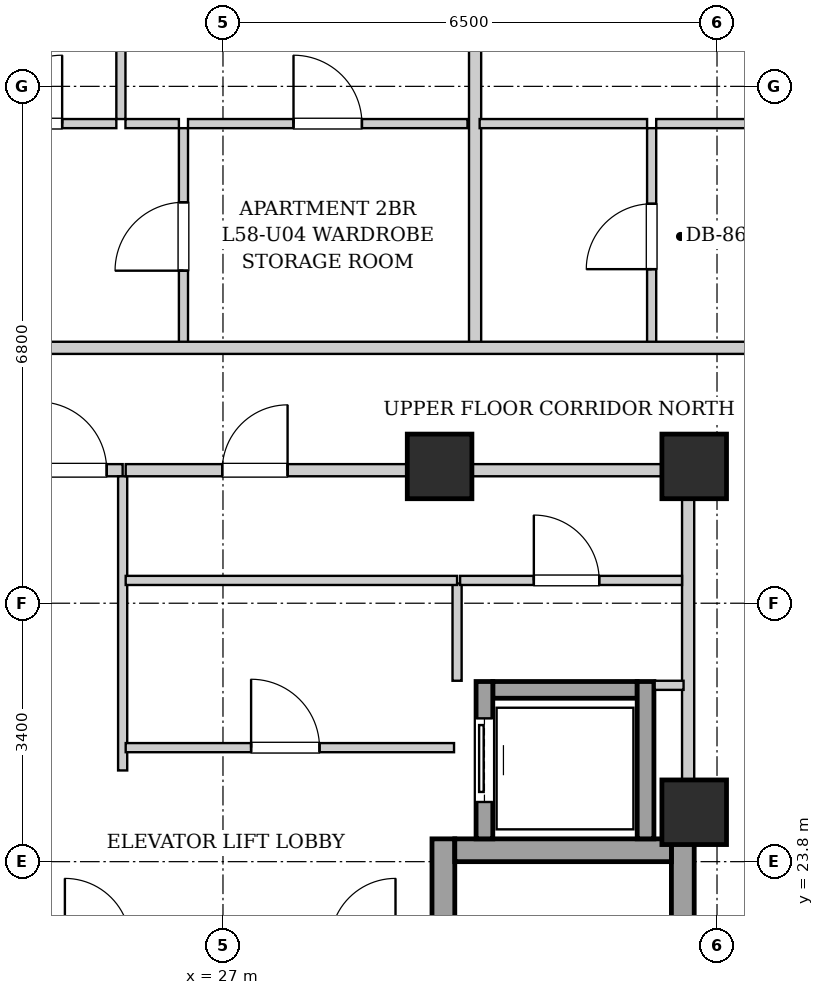
"""IFC4 building model, lengths in metres.
Left out: names, types, materials, properties, quantities, classifications, styles, units other than length and angle.
Written with IfcOpenShell. Run it as: python <this file> out.ifc"""

import sys

from ifc_helpers import new_model, si_unit, direction, frame, frame_2d, origin, origin_2d, place, context, subcontext, project, spatial, rectangle, extrude, element, fill, save


model = new_model("IFC4")
c1 = context("Model", 3, precision=1e-05, world=origin(), true_north=direction((0.0, 1.0)))
c2 = subcontext(c1, "Body", "Model", "MODEL_VIEW")
j1 = project(units=[si_unit("LENGTHUNIT", "METRE"), si_unit("PLANEANGLEUNIT", "RADIAN")], contexts=[c1])
p1 = place(None, origin())
s1 = spatial("IfcSite", under=j1, at=p1, CompositionType="ELEMENT")
p2 = place(p1, origin())
s2 = spatial("IfcBuilding", under=s1, at=p2, CompositionType="ELEMENT")
p3 = place(p2, frame((0.0, 0.0, 200.8)))
s3 = spatial("IfcBuildingStorey", under=s2, at=p3, CompositionType="ELEMENT", Elevation=200.8)
for number, where, z_axis, x_axis in (
    (1, (29.85, 29.0, 0.0), (0.0, 0.0, 1.0), (1.0, 0.0, 0.0)),
    (2, (33.2, 29.0, 0.0), (0.0, 0.0, 1.0), (1.0, 0.0, 0.0)),
    (3, (33.2, 24.45, 0.0), (0.0, 0.0, 1.0), (1.0, 0.0, 0.0)),
):
    element("IfcColumn", number, at=place(p3, frame(where, z_axis=z_axis, x_axis=x_axis)), inside=s3, PredefinedType="COLUMN", context=c2, shape_type="SweptSolid", body=[
        extrude(rectangle(XDim=0.85, YDim=0.85, at=origin_2d()), origin(), (0.0, 0.0, 1.0), 3.3),
    ])
for number, where, z_axis, x_axis in (
    (4, (29.9, 15.1, 0.0), (0.0, 0.0, 1.0), (0.0, 1.0, 0.0)),
    (5, (33.05, 15.1, 0.0), (0.0, 0.0, 1.0), (0.0, 1.0, 0.0)),
):
    element("IfcWall", number, at=place(p3, frame(where, z_axis=z_axis, x_axis=x_axis)), inside=s3, PredefinedType="SHEAR", context=c2, shape_type="SweptSolid", body=[
        extrude(rectangle(XDim=9.0, YDim=0.3, at=frame_2d((4.5, 0.0))), origin(), (0.0, 0.0, 1.0), 3.04),
    ])
p4 = place(p3, frame((30.05, 23.95, 0.0), z_axis=(0.0, 0.0, 1.0), x_axis=(1.0, 0.0, 0.0)))
e6 = element("IfcWall", 6, at=p4, inside=s3, PredefinedType="SHEAR", context=c2, shape_type="SweptSolid", body=[
    extrude(rectangle(XDim=2.85, YDim=0.3, at=frame_2d((1.425, 0.0))), origin(), (0.0, 0.0, 1.0), 3.04),
])
p5 = place(p3, frame((30.55, 26.06, 0.0), z_axis=(0.0, 0.0, 1.0), x_axis=(1.0, 0.0, 0.0)))
e7 = element("IfcWall", 7, at=p5, inside=s3, PredefinedType="SHEAR", context=c2, shape_type="SweptSolid", body=[
    extrude(rectangle(XDim=1.9, YDim=0.22, at=frame_2d((0.95, 0.0))), origin(), (0.0, 0.0, 1.0), 3.04),
])
p6 = place(p3, frame((30.44, 24.1, 0.0), z_axis=(0.0, 0.0, 1.0), x_axis=(0.0, 1.0, 0.0)))
e8 = element("IfcWall", 8, at=p6, inside=s3, PredefinedType="SHEAR", context=c2, shape_type="SweptSolid", body=[
    extrude(rectangle(XDim=2.07, YDim=0.22, at=frame_2d((1.035, 0.0))), origin(), (0.0, 0.0, 1.0), 3.04),
])
p7 = place(p6, frame((0.485, 0.0, 0.0)))
e9 = element("IfcOpeningElement", 9, at=p7, cuts=e8, PredefinedType="OPENING", context=c2, shape_type="SweptSolid", body=[
    extrude(rectangle(XDim=1.1, YDim=2.15, at=frame_2d((0.55, 1.075))), frame((0.0, 0.12, 0.0), z_axis=(0.0, -1.0, 0.0), x_axis=(1.0, 0.0, 0.0)), (0.0, 0.0, 1.0), 0.24),
])
p8 = place(p3, frame((32.56, 24.1, 0.0), z_axis=(0.0, 0.0, 1.0), x_axis=(0.0, 1.0, 0.0)))
e10 = element("IfcWall", 10, at=p8, inside=s3, PredefinedType="SHEAR", context=c2, shape_type="SweptSolid", body=[
    extrude(rectangle(XDim=2.07, YDim=0.22, at=frame_2d((1.035, 0.0))), origin(), (0.0, 0.0, 1.0), 3.04),
])
p9 = place(p3, frame((33.12, 24.12, 0.0), z_axis=(0.0, 0.0, 1.0), x_axis=(0.0, 1.0, 0.0)))
e11 = element("IfcWall", 11, at=p9, inside=s3, PredefinedType="PARTITIONING", context=c2, shape_type="SweptSolid", body=[
    extrude(rectangle(XDim=4.76, YDim=0.16, at=frame_2d((2.38, 0.0))), origin(), (0.0, 0.0, 1.0), 3.04),
])
p10 = place(p3, frame((24.36, 28.95, 0.0), z_axis=(0.0, 0.0, 1.0), x_axis=(1.0, 0.0, 0.0)))
e12 = element("IfcWall", 12, at=p10, inside=s3, PredefinedType="PARTITIONING", context=c2, shape_type="SweptSolid", body=[
    extrude(rectangle(XDim=1.32, YDim=0.16, at=frame_2d((0.66, 0.0))), origin(), (0.0, 0.0, 1.0), 2.556),
])
p11 = place(p10, frame((0.21, 0.0, 0.0)))
e13 = element("IfcOpeningElement", 13, at=p11, cuts=e12, PredefinedType="OPENING", context=c2, shape_type="SweptSolid", body=[
    extrude(rectangle(XDim=0.9, YDim=2.05, at=frame_2d((0.45, 1.025))), frame((0.0, 0.09, 0.0), z_axis=(0.0, -1.0, 0.0), x_axis=(1.0, 0.0, 0.0)), (0.0, 0.0, 1.0), 0.18),
])
p12 = place(p3, frame((25.68, 25.0, 0.0), z_axis=(0.0, 0.0, 1.0), x_axis=(0.0, 1.0, 0.0)))
e14 = element("IfcWall", 14, at=p12, inside=s3, PredefinedType="PARTITIONING", context=c2, shape_type="SweptSolid", body=[
    extrude(rectangle(XDim=3.87, YDim=0.12, at=frame_2d((1.935, 0.0))), origin(), (0.0, 0.0, 1.0), 3.04),
])
p13 = place(p3, frame((30.08, 26.18, 0.0), z_axis=(0.0, 0.0, 1.0), x_axis=(0.0, 1.0, 0.0)))
e15 = element("IfcWall", 15, at=p13, inside=s3, PredefinedType="PARTITIONING", context=c2, shape_type="SweptSolid", body=[
    extrude(rectangle(XDim=1.28, YDim=0.12, at=frame_2d((0.64, 0.0))), origin(), (0.0, 0.0, 1.0), 3.04),
])
p14 = place(p3, frame((32.68, 26.12, 0.0), z_axis=(0.0, 0.0, 1.0), x_axis=(1.0, 0.0, 0.0)))
e16 = element("IfcWall", 16, at=p14, inside=s3, PredefinedType="PARTITIONING", context=c2, shape_type="SweptSolid", body=[
    extrude(rectangle(XDim=0.38, YDim=0.12, at=frame_2d((0.19, 0.0))), origin(), (0.0, 0.0, 1.0), 3.04),
])
p15 = place(p3, frame((30.12, 27.5, 0.0), z_axis=(0.0, 0.0, 1.0), x_axis=(1.0, 0.0, 0.0)))
e17 = element("IfcWall", 17, at=p15, inside=s3, PredefinedType="PARTITIONING", context=c2, shape_type="SweptSolid", body=[
    extrude(rectangle(XDim=2.92, YDim=0.12, at=frame_2d((1.46, 0.0))), origin(), (0.0, 0.0, 1.0), 3.04),
])
p16 = place(p15, frame((0.97, 0.0, 0.0)))
e18 = element("IfcOpeningElement", 18, at=p16, cuts=e17, PredefinedType="OPENING", context=c2, shape_type="SweptSolid", body=[
    extrude(rectangle(XDim=0.86, YDim=2.05, at=frame_2d((0.43, 1.025))), frame((0.0, 0.07, 0.0), z_axis=(0.0, -1.0, 0.0), x_axis=(1.0, 0.0, 0.0)), (0.0, 0.0, 1.0), 0.14),
])
p17 = place(p3, frame((25.72, 27.5, 0.0), z_axis=(0.0, 0.0, 1.0), x_axis=(1.0, 0.0, 0.0)))
e19 = element("IfcWall", 19, at=p17, inside=s3, PredefinedType="PARTITIONING", context=c2, shape_type="SweptSolid", body=[
    extrude(rectangle(XDim=4.36, YDim=0.12, at=frame_2d((2.18, 0.0))), origin(), (0.0, 0.0, 1.0), 3.04),
])
p18 = place(p3, frame((25.72, 25.3, 0.0), z_axis=(0.0, 0.0, 1.0), x_axis=(1.0, 0.0, 0.0)))
e20 = element("IfcWall", 20, at=p18, inside=s3, PredefinedType="PARTITIONING", context=c2, shape_type="SweptSolid", body=[
    extrude(rectangle(XDim=4.32, YDim=0.12, at=frame_2d((2.16, 0.0))), origin(), (0.0, 0.0, 1.0), 3.04),
])
p19 = place(p18, frame((1.65, 0.0, 0.0)))
e21 = element("IfcOpeningElement", 21, at=p19, cuts=e20, PredefinedType="OPENING", context=c2, shape_type="SweptSolid", body=[
    extrude(rectangle(XDim=0.9, YDim=2.05, at=frame_2d((0.45, 1.025))), frame((0.0, 0.07, 0.0), z_axis=(0.0, -1.0, 0.0), x_axis=(1.0, 0.0, 0.0)), (0.0, 0.0, 1.0), 0.14),
])
p20 = place(p3, frame((25.72, 28.95, 0.0), z_axis=(0.0, 0.0, 1.0), x_axis=(1.0, 0.0, 0.0)))
e22 = element("IfcWall", 22, at=p20, inside=s3, PredefinedType="PARTITIONING", context=c2, shape_type="SweptSolid", body=[
    extrude(rectangle(XDim=7.32, YDim=0.16, at=frame_2d((3.66, 0.0))), origin(), (0.0, 0.0, 1.0), 2.556),
])
p21 = place(p20, frame((1.27, 0.0, 0.0)))
e23 = element("IfcOpeningElement", 23, at=p21, cuts=e22, PredefinedType="OPENING", context=c2, shape_type="SweptSolid", body=[
    extrude(rectangle(XDim=0.86, YDim=2.05, at=frame_2d((0.43, 1.025))), frame((0.0, 0.09, 0.0), z_axis=(0.0, -1.0, 0.0), x_axis=(1.0, 0.0, 0.0)), (0.0, 0.0, 1.0), 0.18),
])
p22 = place(p3, frame((26.48, 30.6, 0.0), z_axis=(0.0, 0.0, 1.0), x_axis=(0.0, 1.0, 0.0)))
e24 = element("IfcWall", 24, at=p22, inside=s3, PredefinedType="PARTITIONING", context=c2, shape_type="SweptSolid", body=[
    extrude(rectangle(XDim=2.85, YDim=0.12, at=frame_2d((1.425, 0.0))), origin(), (0.0, 0.0, 1.0), 3.04),
])
p23 = place(p22, frame((0.975, 0.0, 0.0)))
e25 = element("IfcOpeningElement", 25, at=p23, cuts=e24, PredefinedType="OPENING", context=c2, shape_type="SweptSolid", body=[
    extrude(rectangle(XDim=0.9, YDim=2.05, at=frame_2d((0.45, 1.025))), frame((0.0, 0.07, 0.0), z_axis=(0.0, -1.0, 0.0), x_axis=(1.0, 0.0, 0.0)), (0.0, 0.0, 1.0), 0.14),
])
p24 = place(p3, frame((23.27, 33.51, 0.0), z_axis=(0.0, 0.0, 1.0), x_axis=(1.0, 0.0, 0.0)))
e26 = element("IfcWall", 26, at=p24, inside=s3, PredefinedType="PARTITIONING", context=c2, shape_type="SweptSolid", body=[
    extrude(rectangle(XDim=2.327, YDim=0.12, at=frame_2d((1.164, 0.0))), origin(), (0.0, 0.0, 1.0), 3.04),
])
p25 = place(p24, frame((0.714, 0.0, 0.0)))
e27 = element("IfcOpeningElement", 27, at=p25, cuts=e26, PredefinedType="OPENING", context=c2, shape_type="SweptSolid", body=[
    extrude(rectangle(XDim=0.9, YDim=2.05, at=frame_2d((0.45, 1.025))), frame((0.0, 0.07, 0.0), z_axis=(0.0, -1.0, 0.0), x_axis=(1.0, 0.0, 0.0)), (0.0, 0.0, 1.0), 0.14),
])
p26 = place(p3, frame((25.717, 33.51, 0.0), z_axis=(0.0, 0.0, 1.0), x_axis=(1.0, 0.0, 0.0)))
e28 = element("IfcWall", 28, at=p26, inside=s3, PredefinedType="PARTITIONING", context=c2, shape_type="SweptSolid", body=[
    extrude(rectangle(XDim=0.703, YDim=0.12, at=frame_2d((0.352, 0.0))), origin(), (0.0, 0.0, 1.0), 3.04),
])
p27 = place(p3, frame((26.54, 33.51, 0.0), z_axis=(0.0, 0.0, 1.0), x_axis=(1.0, 0.0, 0.0)))
e29 = element("IfcWall", 29, at=p27, inside=s3, PredefinedType="PARTITIONING", context=c2, shape_type="SweptSolid", body=[
    extrude(rectangle(XDim=3.677, YDim=0.12, at=frame_2d((1.838, 0.0))), origin(), (0.0, 0.0, 1.0), 3.04),
])
p28 = place(p27, frame((1.388, 0.0, 0.0)))
e30 = element("IfcOpeningElement", 30, at=p28, cuts=e29, PredefinedType="OPENING", context=c2, shape_type="SweptSolid", body=[
    extrude(rectangle(XDim=0.9, YDim=2.05, at=frame_2d((0.45, 1.025))), frame((0.0, 0.07, 0.0), z_axis=(0.0, -1.0, 0.0), x_axis=(1.0, 0.0, 0.0)), (0.0, 0.0, 1.0), 0.14),
])
p29 = place(p3, frame((25.657, 33.57, 0.0), z_axis=(0.0, 0.0, 1.0), x_axis=(0.0, 1.0, 0.0)))
e31 = element("IfcWall", 31, at=p29, inside=s3, PredefinedType="PARTITIONING", context=c2, shape_type="SweptSolid", body=[
    extrude(rectangle(XDim=6.35, YDim=0.12, at=frame_2d((3.175, 0.0))), origin(), (0.0, 0.0, 1.0), 3.04),
])
p30 = place(p29, frame((2.71, 0.0, 0.0)))
e32 = element("IfcOpeningElement", 32, at=p30, cuts=e31, PredefinedType="OPENING", context=c2, shape_type="SweptSolid", body=[
    extrude(rectangle(XDim=0.9, YDim=2.05, at=frame_2d((0.45, 1.025))), frame((0.0, 0.07, 0.0), z_axis=(0.0, -1.0, 0.0), x_axis=(1.0, 0.0, 0.0)), (0.0, 0.0, 1.0), 0.14),
])
p31 = place(p3, frame((30.317, 30.6, 0.0), z_axis=(0.0, 0.0, 1.0), x_axis=(0.0, 1.0, 0.0)))
e33 = element("IfcWall", 33, at=p31, inside=s3, PredefinedType="PARTITIONING", context=c2, shape_type="SweptSolid", body=[
    extrude(rectangle(XDim=9.32, YDim=0.16, at=frame_2d((4.66, 0.0))), origin(), (0.0, 0.0, 1.0), 3.04),
])
p32 = place(p3, frame((32.64, 30.6, 0.0), z_axis=(0.0, 0.0, 1.0), x_axis=(0.0, 1.0, 0.0)))
e34 = element("IfcWall", 34, at=p32, inside=s3, PredefinedType="PARTITIONING", context=c2, shape_type="SweptSolid", body=[
    extrude(rectangle(XDim=2.85, YDim=0.12, at=frame_2d((1.425, 0.0))), origin(), (0.0, 0.0, 1.0), 3.04),
])
p33 = place(p32, frame((0.995, 0.0, 0.0)))
e35 = element("IfcOpeningElement", 35, at=p33, cuts=e34, PredefinedType="OPENING", context=c2, shape_type="SweptSolid", body=[
    extrude(rectangle(XDim=0.86, YDim=2.05, at=frame_2d((0.43, 1.025))), frame((0.0, 0.07, 0.0), z_axis=(0.0, -1.0, 0.0), x_axis=(1.0, 0.0, 0.0)), (0.0, 0.0, 1.0), 0.14),
])
p34 = place(p3, frame((30.377, 33.51, 0.0), z_axis=(0.0, 0.0, 1.0), x_axis=(1.0, 0.0, 0.0)))
e36 = element("IfcWall", 36, at=p34, inside=s3, PredefinedType="PARTITIONING", context=c2, shape_type="SweptSolid", body=[
    extrude(rectangle(XDim=2.203, YDim=0.12, at=frame_2d((1.102, 0.0))), origin(), (0.0, 0.0, 1.0), 3.04),
])
p35 = place(p3, frame((32.7, 33.51, 0.0), z_axis=(0.0, 0.0, 1.0), x_axis=(1.0, 0.0, 0.0)))
e37 = element("IfcWall", 37, at=p35, inside=s3, PredefinedType="PARTITIONING", context=c2, shape_type="SweptSolid", body=[
    extrude(rectangle(XDim=5.02, YDim=0.12, at=frame_2d((2.51, 0.0))), origin(), (0.0, 0.0, 1.0), 3.04),
])
p36 = place(p35, frame((2.06, 0.0, 0.0)))
e38 = element("IfcOpeningElement", 38, at=p36, cuts=e37, PredefinedType="OPENING", context=c2, shape_type="SweptSolid", body=[
    extrude(rectangle(XDim=0.9, YDim=2.05, at=frame_2d((0.45, 1.025))), frame((0.0, 0.07, 0.0), z_axis=(0.0, -1.0, 0.0), x_axis=(1.0, 0.0, 0.0)), (0.0, 0.0, 1.0), 0.14),
])
p37 = place(p3, frame((13.15, 30.56, 0.0), z_axis=(0.0, 0.0, 1.0), x_axis=(1.0, 0.0, 0.0)))
e39 = element("IfcWall", 39, at=p37, inside=s3, PredefinedType="PARTITIONING", context=c2, shape_type="SweptSolid", body=[
    extrude(rectangle(XDim=24.6, YDim=0.16, at=frame_2d((12.3, 0.0))), origin(), (0.0, 0.0, 1.0), 3.04),
])
p38 = place(p37, frame((3.115, 0.0, 0.0)))
e40 = element("IfcOpeningElement", 40, at=p38, cuts=e39, PredefinedType="OPENING", context=c2, shape_type="SweptSolid", body=[
    extrude(rectangle(XDim=0.95, YDim=2.1, at=frame_2d((0.475, 1.05))), frame((0.0, 0.09, 0.0), z_axis=(0.0, -1.0, 0.0), x_axis=(1.0, 0.0, 0.0)), (0.0, 0.0, 1.0), 0.18),
])
p39 = place(p37, frame((21.55, 0.0, 0.0)))
e41 = element("IfcOpeningElement", 41, at=p39, cuts=e39, PredefinedType="OPENING", context=c2, shape_type="SweptSolid", body=[
    extrude(rectangle(XDim=0.95, YDim=2.1, at=frame_2d((0.475, 1.05))), frame((0.0, 0.09, 0.0), z_axis=(0.0, -1.0, 0.0), x_axis=(1.0, 0.0, 0.0)), (0.0, 0.0, 1.0), 0.18),
])
p40 = place(p7, origin())
e42 = element("IfcDoor", 42, at=p40, inside=s3, OperationType="SLIDING_TO_LEFT", PredefinedType="DOOR", context=c2, shape_type="SweptSolid", body=[
    extrude(rectangle(XDim=1.1, YDim=2.15, at=frame_2d((0.55, 1.075))), frame((0.0, 0.025, 0.0), z_axis=(0.0, -1.0, 0.0), x_axis=(1.0, 0.0, 0.0)), (0.0, 0.0, 1.0), 0.05),
])
fill(e9, e42)
p41 = place(p11, origin())
e43 = element("IfcDoor", 43, at=p41, inside=s3, OperationType="SINGLE_SWING_LEFT", PredefinedType="DOOR", context=c2, shape_type="SweptSolid", body=[
    extrude(rectangle(XDim=0.9, YDim=2.05, at=frame_2d((0.45, 1.025))), frame((0.0, 0.025, 0.0), z_axis=(0.0, -1.0, 0.0), x_axis=(1.0, 0.0, 0.0)), (0.0, 0.0, 1.0), 0.05),
])
fill(e13, e43)
p42 = place(p16, origin())
e44 = element("IfcDoor", 44, at=p42, inside=s3, OperationType="SINGLE_SWING_LEFT", PredefinedType="DOOR", context=c2, shape_type="SweptSolid", body=[
    extrude(rectangle(XDim=0.86, YDim=2.05, at=frame_2d((0.43, 1.025))), frame((0.0, 0.025, 0.0), z_axis=(0.0, -1.0, 0.0), x_axis=(1.0, 0.0, 0.0)), (0.0, 0.0, 1.0), 0.05),
])
fill(e18, e44)
p43 = place(p19, origin())
e45 = element("IfcDoor", 45, at=p43, inside=s3, OperationType="SINGLE_SWING_LEFT", PredefinedType="DOOR", context=c2, shape_type="SweptSolid", body=[
    extrude(rectangle(XDim=0.9, YDim=2.05, at=frame_2d((0.45, 1.025))), frame((0.0, 0.025, 0.0), z_axis=(0.0, -1.0, 0.0), x_axis=(1.0, 0.0, 0.0)), (0.0, 0.0, 1.0), 0.05),
])
fill(e21, e45)
p44 = place(p21, origin())
e46 = element("IfcDoor", 46, at=p44, inside=s3, OperationType="SINGLE_SWING_RIGHT", PredefinedType="DOOR", context=c2, shape_type="SweptSolid", body=[
    extrude(rectangle(XDim=0.86, YDim=2.05, at=frame_2d((0.43, 1.025))), frame((0.0, 0.025, 0.0), z_axis=(0.0, -1.0, 0.0), x_axis=(1.0, 0.0, 0.0)), (0.0, 0.0, 1.0), 0.05),
])
fill(e23, e46)
p45 = place(p23, origin())
e47 = element("IfcDoor", 47, at=p45, inside=s3, OperationType="SINGLE_SWING_LEFT", PredefinedType="DOOR", context=c2, shape_type="SweptSolid", body=[
    extrude(rectangle(XDim=0.9, YDim=2.05, at=frame_2d((0.45, 1.025))), frame((0.0, 0.025, 0.0), z_axis=(0.0, -1.0, 0.0), x_axis=(1.0, 0.0, 0.0)), (0.0, 0.0, 1.0), 0.05),
])
fill(e25, e47)
p46 = place(p25, origin())
e48 = element("IfcDoor", 48, at=p46, inside=s3, OperationType="SINGLE_SWING_RIGHT", PredefinedType="DOOR", context=c2, shape_type="SweptSolid", body=[
    extrude(rectangle(XDim=0.9, YDim=2.05, at=frame_2d((0.45, 1.025))), frame((0.0, 0.025, 0.0), z_axis=(0.0, -1.0, 0.0), x_axis=(1.0, 0.0, 0.0)), (0.0, 0.0, 1.0), 0.05),
])
fill(e27, e48)
p47 = place(p28, origin())
e49 = element("IfcDoor", 49, at=p47, inside=s3, OperationType="SINGLE_SWING_LEFT", PredefinedType="DOOR", context=c2, shape_type="SweptSolid", body=[
    extrude(rectangle(XDim=0.9, YDim=2.05, at=frame_2d((0.45, 1.025))), frame((0.0, 0.025, 0.0), z_axis=(0.0, -1.0, 0.0), x_axis=(1.0, 0.0, 0.0)), (0.0, 0.0, 1.0), 0.05),
])
fill(e30, e49)
p48 = place(p33, origin())
e50 = element("IfcDoor", 50, at=p48, inside=s3, OperationType="SINGLE_SWING_LEFT", PredefinedType="DOOR", context=c2, shape_type="SweptSolid", body=[
    extrude(rectangle(XDim=0.86, YDim=2.05, at=frame_2d((0.43, 1.025))), frame((0.0, 0.025, 0.0), z_axis=(0.0, -1.0, 0.0), x_axis=(1.0, 0.0, 0.0)), (0.0, 0.0, 1.0), 0.05),
])
fill(e35, e50)
save(model, sys.argv[1])
